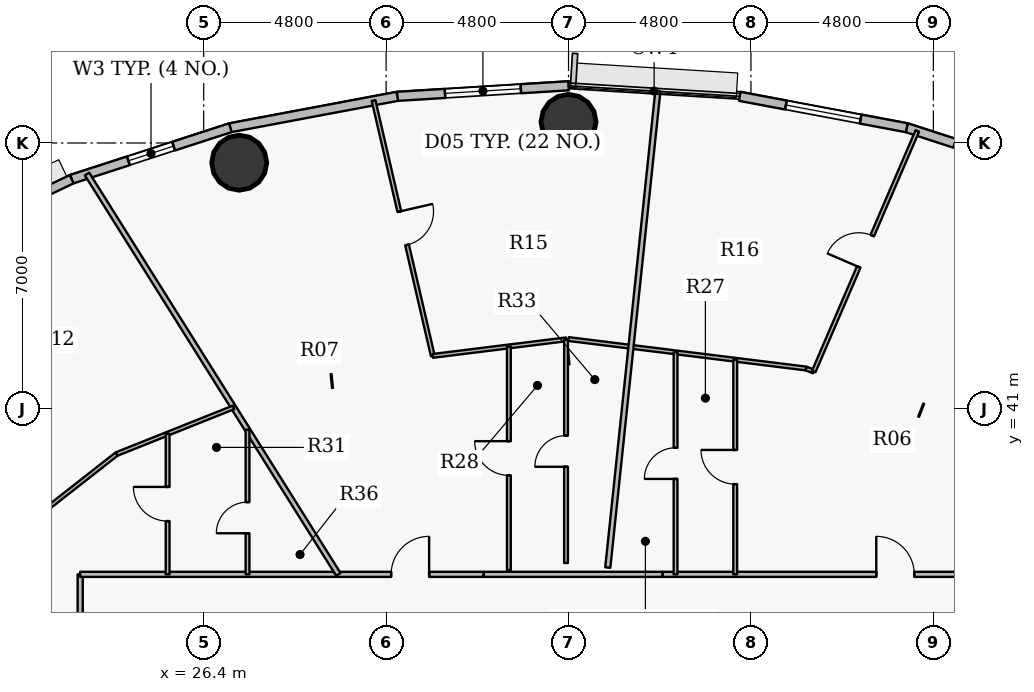
"""IFC4 building model, lengths in metres.
Left out: names, types, materials, properties, quantities, classifications, styles, units other than length and angle.
Written with IfcOpenShell. Run it as: python <this file> out.ifc"""

import sys

from ifc_helpers import new_model, si_unit, direction, frame, frame_2d, origin, origin_2d, place, context, subcontext, project, spatial, rectangle, hollow_circle, extrude, source, transform, mapped, element, fill, save


model = new_model("IFC4")
c1 = context("Model", 3, precision=1e-05, world=origin(), true_north=direction((0.0, 1.0)))
c2 = subcontext(c1, "Body", "Model", "MODEL_VIEW")
j1 = project(units=[si_unit("LENGTHUNIT", "METRE"), si_unit("PLANEANGLEUNIT", "RADIAN")], contexts=[c1])
p1 = place(None, origin())
s1 = spatial("IfcSite", under=j1, at=p1, CompositionType="ELEMENT")
p2 = place(p1, origin())
s2 = spatial("IfcBuilding", under=s1, at=p2, CompositionType="ELEMENT")
p3 = place(p2, frame((0.0, 0.0, 115.95)))
s3 = spatial("IfcBuildingStorey", under=s2, at=p3, CompositionType="ELEMENT", Elevation=115.95)
for number, where, z_axis, x_axis in (
    (1, (36.0, 48.555, 0.0), (0.0, 0.0, 1.0), (1.0, 0.0, 0.0)),
    (2, (27.334, 47.481, 0.0), (0.0, 0.0, 1.0), (1.0, 0.0, 0.0)),
):
    element("IfcColumn", number, at=place(p3, frame(where, z_axis=z_axis, x_axis=x_axis)), inside=s3, PredefinedType="COLUMN", context=c2, shape_type="SweptSolid", body=[
        extrude(hollow_circle(Radius=0.725, WallThickness=0.042, at=origin_2d()), origin(), (0.0, 0.0, 1.0), 3.75),
    ])
p4 = place(p3, frame((44.9, 48.401, 0.0), z_axis=(0.0, 0.0, 1.0), x_axis=(0.951211346073, -0.308540070495, 0.0)))
e3 = element("IfcWall", 3, at=p4, inside=s3, PredefinedType="SOLIDWALL", context=c2, shape_type="SweptSolid", body=[
    extrude(rectangle(XDim=4.388, YDim=0.24, at=frame_2d((2.194, 0.0))), origin(), (0.0, 0.0, 1.0), 3.5),
])
p5 = place(p4, frame((1.329, 0.0, 0.9)))
e4 = element("IfcOpeningElement", 4, at=p5, cuts=e3, PredefinedType="OPENING", context=c2, shape_type="SweptSolid", body=[
    extrude(rectangle(XDim=2.0, YDim=1.75, at=origin_2d()), frame((1.0, 0.13, 0.875), z_axis=(0.0, -1.0, 0.0), x_axis=(1.0, 0.0, 0.0)), (0.0, 0.0, 1.0), 0.26),
])
p6 = place(p3, frame((40.506, 49.227, 0.0), z_axis=(0.0, 0.0, 1.0), x_axis=(0.982789252177, -0.184730305596, 0.0)))
e5 = element("IfcWall", 5, at=p6, inside=s3, PredefinedType="SOLIDWALL", context=c2, shape_type="SweptSolid", body=[
    extrude(rectangle(XDim=4.471, YDim=0.24, at=frame_2d((2.235, 0.0))), origin(), (0.0, 0.0, 1.0), 3.5),
])
p7 = place(p6, frame((1.236, 0.0, 0.9)))
e6 = element("IfcOpeningElement", 6, at=p7, cuts=e5, PredefinedType="OPENING", context=c2, shape_type="SweptSolid", body=[
    extrude(rectangle(XDim=2.0, YDim=1.75, at=origin_2d()), frame((1.0, 0.13, 0.875), z_axis=(0.0, -1.0, 0.0), x_axis=(1.0, 0.0, 0.0)), (0.0, 0.0, 1.0), 0.26),
])
p8 = place(p3, frame((31.494, 49.227, 0.0), z_axis=(0.0, 0.0, 1.0), x_axis=(0.998107531589, 0.061492726276, 0.0)))
e7 = element("IfcWall", 7, at=p8, inside=s3, PredefinedType="SOLIDWALL", context=c2, shape_type="SweptSolid", body=[
    extrude(rectangle(XDim=4.514, YDim=0.24, at=frame_2d((2.257, 0.0))), origin(), (0.0, 0.0, 1.0), 3.5),
])
p9 = place(p8, frame((1.257, 0.0, 0.9)))
e8 = element("IfcOpeningElement", 8, at=p9, cuts=e7, PredefinedType="OPENING", context=c2, shape_type="SweptSolid", body=[
    extrude(rectangle(XDim=2.0, YDim=1.75, at=origin_2d()), frame((1.0, 0.13, 0.875), z_axis=(0.0, -1.0, 0.0), x_axis=(1.0, 0.0, 0.0)), (0.0, 0.0, 1.0), 0.26),
])
p10 = place(p3, frame((27.1, 48.401, 0.0), z_axis=(0.0, 0.0, 1.0), x_axis=(0.982789252177, 0.184730305596, 0.0)))
e9 = element("IfcWall", 9, at=p10, inside=s3, PredefinedType="SOLIDWALL", context=c2, shape_type="SweptSolid", body=[
    extrude(rectangle(XDim=4.471, YDim=0.24, at=frame_2d((2.235, 0.0))), origin(), (0.0, 0.0, 1.0), 3.5),
])
p11 = place(p3, frame((22.926, 47.047, 0.0), z_axis=(0.0, 0.0, 1.0), x_axis=(0.951211346073, 0.308540070495, 0.0)))
e10 = element("IfcWall", 10, at=p11, inside=s3, PredefinedType="SOLIDWALL", context=c2, shape_type="SweptSolid", body=[
    extrude(rectangle(XDim=4.388, YDim=0.24, at=frame_2d((2.194, 0.0))), origin(), (0.0, 0.0, 1.0), 3.5),
])
p12 = place(p11, frame((1.569, 0.0, 0.9)))
e11 = element("IfcOpeningElement", 11, at=p12, cuts=e10, PredefinedType="OPENING", context=c2, shape_type="SweptSolid", body=[
    extrude(rectangle(XDim=1.25, YDim=1.65, at=origin_2d()), frame((0.625, 0.13, 0.825), z_axis=(0.0, -1.0, 0.0), x_axis=(1.0, 0.0, 0.0)), (0.0, 0.0, 1.0), 0.26),
])
p13 = place(p3, frame((19.075, 45.199, 0.0), z_axis=(0.0, 0.0, 1.0), x_axis=(0.901589935876, 0.432591709962, 0.0)))
e12 = element("IfcWall", 12, at=p13, inside=s3, PredefinedType="SOLIDWALL", context=c2, shape_type="SweptSolid", body=[
    extrude(rectangle(XDim=4.272, YDim=0.24, at=frame_2d((2.136, 0.0))), origin(), (0.0, 0.0, 1.0), 3.5),
])
p14 = place(p13, frame((1.136, 0.0, 0.9)))
e13 = element("IfcOpeningElement", 13, at=p14, cuts=e12, PredefinedType="OPENING", context=c2, shape_type="SweptSolid", body=[
    extrude(rectangle(XDim=2.0, YDim=1.75, at=origin_2d()), frame((1.0, 0.13, 0.875), z_axis=(0.0, -1.0, 0.0), x_axis=(1.0, 0.0, 0.0)), (0.0, 0.0, 1.0), 0.26),
])
p15 = place(p3, frame((9.91, 36.375, 0.0), z_axis=(0.0, 0.0, 1.0), x_axis=(0.941089213164, -0.338158384292, 0.0)))
e14 = element("IfcWall", 14, at=p15, inside=s3, PredefinedType="PARTITIONING", context=c2, shape_type="SweptSolid", body=[
    extrude(rectangle(XDim=14.069, YDim=0.135, at=frame_2d((7.035, 0.0))), origin(), (0.0, 0.0, 1.0), 2.935),
])
p16 = place(p3, frame((22.064, 38.214, 0.0), z_axis=(0.0, 0.0, 1.0), x_axis=(0.787364158956, 0.616488184146, 0.0)))
e15 = element("IfcWall", 15, at=p16, inside=s3, PredefinedType="PARTITIONING", context=c2, shape_type="SweptSolid", body=[
    extrude(rectangle(XDim=2.597, YDim=0.1, at=frame_2d((1.299, 0.0))), origin(), (0.0, 0.0, 1.0), 3.5),
])
p17 = place(p3, frame((23.15, 17.35, 0.0), z_axis=(0.0, 0.0, 1.0), x_axis=(0.0, 1.0, 0.0)))
e16 = element("IfcWall", 16, at=p17, inside=s3, PredefinedType="PARTITIONING", context=c2, shape_type="SweptSolid", body=[
    extrude(rectangle(XDim=19.3, YDim=0.135, at=frame_2d((9.65, 0.0))), origin(), (0.0, 0.0, 1.0), 2.935),
])
p18 = place(p17, frame((16.264, 0.0, 0.0)))
e17 = element("IfcOpeningElement", 17, at=p18, cuts=e16, PredefinedType="OPENING", context=c2, shape_type="SweptSolid", body=[
    extrude(rectangle(XDim=1.0, YDim=2.15, at=origin_2d()), frame((0.5, 0.078, 1.075), z_axis=(0.0, -1.0, 0.0), x_axis=(1.0, 0.0, 0.0)), (0.0, 0.0, 1.0), 0.155),
])
p19 = place(p17, frame((7.426, 0.0, 0.0)))
e18 = element("IfcOpeningElement", 18, at=p19, cuts=e16, PredefinedType="OPENING", context=c2, shape_type="SweptSolid", body=[
    extrude(rectangle(XDim=1.0, YDim=2.15, at=origin_2d()), frame((0.5, 0.078, 1.075), z_axis=(0.0, -1.0, 0.0), x_axis=(1.0, 0.0, 0.0)), (0.0, 0.0, 1.0), 0.155),
])
p20 = place(p3, frame((23.15, 36.65, 0.0), z_axis=(0.0, 0.0, 1.0), x_axis=(1.0, 0.0, 0.0)))
e19 = element("IfcWall", 19, at=p20, inside=s3, PredefinedType="PARTITIONING", context=c2, shape_type="SweptSolid", body=[
    extrude(rectangle(XDim=10.612, YDim=0.135, at=frame_2d((5.306, 0.0))), origin(), (0.0, 0.0, 1.0), 2.935),
])
p21 = place(p20, frame((8.182, 0.0, 0.0)))
e20 = element("IfcOpeningElement", 20, at=p21, cuts=e19, PredefinedType="OPENING", context=c2, shape_type="SweptSolid", body=[
    extrude(rectangle(XDim=1.0, YDim=2.15, at=origin_2d()), frame((0.5, 0.078, 1.075), z_axis=(0.0, -1.0, 0.0), x_axis=(1.0, 0.0, 0.0)), (0.0, 0.0, 1.0), 0.155),
])
p22 = place(p3, frame((23.33, 47.184, 0.0), z_axis=(0.0, 0.0, 1.0), x_axis=(0.531660079213, -0.846957826678, 0.0)))
e21 = element("IfcWall", 21, at=p22, inside=s3, PredefinedType="PARTITIONING", context=c2, shape_type="SweptSolid", body=[
    extrude(rectangle(XDim=12.437, YDim=0.135, at=frame_2d((6.219, 0.0))), origin(), (0.0, 0.0, 1.0), 2.935),
])
p23 = place(p3, frame((24.109, 39.816, 0.0), z_axis=(0.0, 0.0, 1.0), x_axis=(0.928811896505, 0.370551563092, 0.0)))
e22 = element("IfcWall", 22, at=p23, inside=s3, PredefinedType="PARTITIONING", context=c2, shape_type="SweptSolid", body=[
    extrude(rectangle(XDim=3.312, YDim=0.1, at=frame_2d((1.656, 0.0))), origin(), (0.0, 0.0, 1.0), 3.5),
])
p24 = place(p3, frame((25.451, 36.65, 0.0), z_axis=(0.0, 0.0, 1.0), x_axis=(0.0, 1.0, 0.0)))
e23 = element("IfcWall", 23, at=p24, inside=s3, PredefinedType="PARTITIONING", context=c2, shape_type="SweptSolid", body=[
    extrude(rectangle(XDim=3.701, YDim=0.1, at=frame_2d((1.851, 0.0))), origin(), (0.0, 0.0, 1.0), 3.5),
])
p25 = place(p24, frame((1.4, 0.0, 0.0)))
e24 = element("IfcOpeningElement", 24, at=p25, cuts=e23, PredefinedType="OPENING", context=c2, shape_type="SweptSolid", body=[
    extrude(rectangle(XDim=0.9, YDim=2.1, at=origin_2d()), frame((0.45, 0.06, 1.05), z_axis=(0.0, -1.0, 0.0), x_axis=(1.0, 0.0, 0.0)), (0.0, 0.0, 1.0), 0.12),
])
p26 = place(p3, frame((27.553, 36.65, 0.0), z_axis=(0.0, 0.0, 1.0), x_axis=(0.0, 1.0, 0.0)))
e25 = element("IfcWall", 25, at=p26, inside=s3, PredefinedType="PARTITIONING", context=c2, shape_type="SweptSolid", body=[
    extrude(rectangle(XDim=3.806, YDim=0.1, at=frame_2d((1.903, 0.0))), origin(), (0.0, 0.0, 1.0), 3.5),
])
p27 = place(p26, frame((1.081, 0.0, 0.0)))
e26 = element("IfcOpeningElement", 26, at=p27, cuts=e25, PredefinedType="OPENING", context=c2, shape_type="SweptSolid", body=[
    extrude(rectangle(XDim=0.82, YDim=2.1, at=origin_2d()), frame((0.41, 0.06, 1.05), z_axis=(0.0, -1.0, 0.0), x_axis=(1.0, 0.0, 0.0)), (0.0, 0.0, 1.0), 0.12),
])
p28 = place(p3, frame((30.87, 49.115, 0.0), z_axis=(0.0, 0.0, 1.0), x_axis=(0.225963524246, -0.97413576349, 0.0)))
e27 = element("IfcWall", 27, at=p28, inside=s3, PredefinedType="PARTITIONING", context=c2, shape_type="SweptSolid", body=[
    extrude(rectangle(XDim=6.895, YDim=0.1, at=frame_2d((3.448, 0.0))), origin(), (0.0, 0.0, 1.0), 2.935),
])
p29 = place(p28, frame((2.998, 0.0, 0.0)))
e28 = element("IfcOpeningElement", 28, at=p29, cuts=e27, PredefinedType="OPENING", context=c2, shape_type="SweptSolid", body=[
    extrude(rectangle(XDim=0.9, YDim=2.1, at=origin_2d()), frame((0.45, 0.06, 1.05), z_axis=(0.0, -1.0, 0.0), x_axis=(1.0, 0.0, 0.0)), (0.0, 0.0, 1.0), 0.12),
])
p30 = place(p3, frame((32.428, 42.398, 0.0), z_axis=(0.0, 0.0, 1.0), x_axis=(0.992389102891, 0.123141660146, 0.0)))
e29 = element("IfcWall", 29, at=p30, inside=s3, PredefinedType="PARTITIONING", context=c2, shape_type="SweptSolid", body=[
    extrude(rectangle(XDim=3.533, YDim=0.1, at=frame_2d((1.767, 0.0))), origin(), (0.0, 0.0, 1.0), 2.935),
])
p31 = place(p3, frame((34.43, 36.762, 0.0), z_axis=(0.0, 0.0, 1.0), x_axis=(0.0, 1.0, 0.0)))
e30 = element("IfcWall", 30, at=p31, inside=s3, PredefinedType="PARTITIONING", context=c2, shape_type="SweptSolid", body=[
    extrude(rectangle(XDim=5.884, YDim=0.1, at=frame_2d((2.942, 0.0))), origin(), (0.0, 0.0, 1.0), 3.185),
])
p32 = place(p31, frame((2.492, 0.0, 0.0)))
e31 = element("IfcOpeningElement", 31, at=p32, cuts=e30, PredefinedType="OPENING", context=c2, shape_type="SweptSolid", body=[
    extrude(rectangle(XDim=0.9, YDim=2.1, at=origin_2d()), frame((0.45, 0.06, 1.05), z_axis=(0.0, -1.0, 0.0), x_axis=(1.0, 0.0, 0.0)), (0.0, 0.0, 1.0), 0.12),
])
p33 = place(p3, frame((35.935, 36.949, 0.0), z_axis=(0.0, 0.0, 1.0), x_axis=(0.0, 1.0, 0.0)))
e32 = element("IfcWall", 32, at=p33, inside=s3, PredefinedType="PARTITIONING", context=c2, shape_type="SweptSolid", body=[
    extrude(rectangle(XDim=5.884, YDim=0.1, at=frame_2d((2.942, 0.0))), origin(), (0.0, 0.0, 1.0), 2.935),
])
p34 = place(p33, frame((2.532, 0.0, 0.0)))
e33 = element("IfcOpeningElement", 33, at=p34, cuts=e32, PredefinedType="OPENING", context=c2, shape_type="SweptSolid", body=[
    extrude(rectangle(XDim=0.82, YDim=2.1, at=origin_2d()), frame((0.41, 0.06, 1.05), z_axis=(0.0, -1.0, 0.0), x_axis=(1.0, 0.0, 0.0)), (0.0, 0.0, 1.0), 0.12),
])
p35 = place(p3, frame((36.0, 42.841, 0.0), z_axis=(0.0, 0.0, 1.0), x_axis=(0.992395485088, -0.123090215599, 0.0)))
e34 = element("IfcWall", 34, at=p35, inside=s3, PredefinedType="PARTITIONING", context=c2, shape_type="SweptSolid", body=[
    extrude(rectangle(XDim=6.299, YDim=0.1, at=frame_2d((3.15, 0.0))), origin(), (0.0, 0.0, 1.0), 2.935),
])
p36 = place(p3, frame((37.033, 36.829, 0.0), z_axis=(0.0, 0.0, 1.0), x_axis=(0.104530526966, 0.994521678463, 0.0)))
e35 = element("IfcWall", 35, at=p36, inside=s3, PredefinedType="PARTITIONING", context=c2, shape_type="SweptSolid", body=[
    extrude(rectangle(XDim=12.605, YDim=0.135, at=frame_2d((6.303, 0.0))), origin(), (0.0, 0.0, 1.0), 2.935),
])
p37 = place(p3, frame((38.477, 36.65, 0.0), z_axis=(0.0, 0.0, 1.0), x_axis=(1.0, 0.0, 0.0)))
e36 = element("IfcWall", 36, at=p37, inside=s3, PredefinedType="PARTITIONING", context=c2, shape_type="SweptSolid", body=[
    extrude(rectangle(XDim=10.373, YDim=0.135, at=frame_2d((5.187, 0.0))), origin(), (0.0, 0.0, 1.0), 2.935),
])
p38 = place(p37, frame((5.621, 0.0, 0.0)))
e37 = element("IfcOpeningElement", 37, at=p38, cuts=e36, PredefinedType="OPENING", context=c2, shape_type="SweptSolid", body=[
    extrude(rectangle(XDim=1.0, YDim=2.15, at=origin_2d()), frame((0.5, 0.078, 1.075), z_axis=(0.0, -1.0, 0.0), x_axis=(1.0, 0.0, 0.0)), (0.0, 0.0, 1.0), 0.155),
])
p39 = place(p3, frame((38.817, 36.65, 0.0), z_axis=(0.0, 0.0, 1.0), x_axis=(0.0, 1.0, 0.0)))
e38 = element("IfcWall", 38, at=p39, inside=s3, PredefinedType="PARTITIONING", context=c2, shape_type="SweptSolid", body=[
    extrude(rectangle(XDim=5.842, YDim=0.1, at=frame_2d((2.921, 0.0))), origin(), (0.0, 0.0, 1.0), 3.5),
])
p40 = place(p39, frame((2.511, 0.0, 0.0)))
e39 = element("IfcOpeningElement", 39, at=p40, cuts=e38, PredefinedType="OPENING", context=c2, shape_type="SweptSolid", body=[
    extrude(rectangle(XDim=0.82, YDim=2.1, at=origin_2d()), frame((0.41, 0.06, 1.05), z_axis=(0.0, -1.0, 0.0), x_axis=(1.0, 0.0, 0.0)), (0.0, 0.0, 1.0), 0.12),
])
p41 = place(p3, frame((40.386, 36.65, 0.0), z_axis=(0.0, 0.0, 1.0), x_axis=(0.0, 1.0, 0.0)))
e40 = element("IfcWall", 40, at=p41, inside=s3, PredefinedType="PARTITIONING", context=c2, shape_type="SweptSolid", body=[
    extrude(rectangle(XDim=5.647, YDim=0.1, at=frame_2d((2.824, 0.0))), origin(), (0.0, 0.0, 1.0), 3.5),
])
p42 = place(p41, frame((2.374, 0.0, 0.0)))
e41 = element("IfcOpeningElement", 41, at=p42, cuts=e40, PredefinedType="OPENING", context=c2, shape_type="SweptSolid", body=[
    extrude(rectangle(XDim=0.9, YDim=2.1, at=origin_2d()), frame((0.45, 0.06, 1.05), z_axis=(0.0, -1.0, 0.0), x_axis=(1.0, 0.0, 0.0)), (0.0, 0.0, 1.0), 0.12),
])
p43 = place(p3, frame((42.251, 42.066, 0.0), z_axis=(0.0, 0.0, 1.0), x_axis=(0.928632622675, -0.371000609303, 0.0)))
e42 = element("IfcWall", 42, at=p43, inside=s3, PredefinedType="PARTITIONING", context=c2, shape_type="SweptSolid", body=[
    extrude(rectangle(XDim=0.216, YDim=0.1, at=frame_2d((0.108, 0.0))), origin(), (0.0, 0.0, 1.0), 3.5),
])
p44 = place(p3, frame((42.452, 41.986, 0.0), z_axis=(0.0, 0.0, 1.0), x_axis=(0.395466235438, 0.918480515105, 0.0)))
e43 = element("IfcWall", 43, at=p44, inside=s3, PredefinedType="PARTITIONING", context=c2, shape_type="SweptSolid", body=[
    extrude(rectangle(XDim=6.893, YDim=0.1, at=frame_2d((3.446, 0.0))), origin(), (0.0, 0.0, 1.0), 2.935),
])
p45 = place(p44, frame((2.996, 0.0, 0.0)))
e44 = element("IfcOpeningElement", 44, at=p45, cuts=e43, PredefinedType="OPENING", context=c2, shape_type="SweptSolid", body=[
    extrude(rectangle(XDim=0.9, YDim=2.1, at=origin_2d()), frame((0.45, 0.06, 1.05), z_axis=(0.0, -1.0, 0.0), x_axis=(1.0, 0.0, 0.0)), (0.0, 0.0, 1.0), 0.12),
])
p46 = place(p3, frame((33.772, 36.65, 0.0), z_axis=(0.0, 0.0, 1.0), x_axis=(1.0, 0.0, 0.0)))
e45 = element("IfcWall", 45, at=p46, inside=s3, PredefinedType="PARTITIONING", context=c2, shape_type="SweptSolid", body=[
    extrude(rectangle(XDim=4.695, YDim=0.135, at=frame_2d((2.348, 0.0))), origin(), (0.0, 0.0, 1.0), 2.935),
])
m1 = source(origin(), c2, "Body", "SweptSolid", [
    extrude(rectangle(XDim=2.0, YDim=1.75, at=origin_2d()), frame((1.0, 0.03, 0.875), z_axis=(0.0, -1.0, 0.0), x_axis=(1.0, 0.0, 0.0)), (0.0, 0.0, 1.0), 0.06),
])
p47 = place(p7, origin())
e46 = element("IfcWindow", 46, at=p47, inside=s3, PartitioningType="DOUBLE_PANEL_VERTICAL", PredefinedType="WINDOW", context=c2, shape_type="MappedRepresentation", body=[
    mapped(m1, transform((0.0, 0.0, 0.0), x_axis=(1.0, 0.0, 0.0), y_axis=(0.0, 1.0, 0.0), z_axis=(0.0, 0.0, 1.0), scale=1.0)),
])
fill(e6, e46)
p48 = place(p9, origin())
e47 = element("IfcWindow", 47, at=p48, inside=s3, PartitioningType="DOUBLE_PANEL_VERTICAL", PredefinedType="WINDOW", context=c2, shape_type="MappedRepresentation", body=[
    mapped(m1, transform((0.0, 0.0, 0.0), x_axis=(1.0, 0.0, 0.0), y_axis=(0.0, 1.0, 0.0), z_axis=(0.0, 0.0, 1.0), scale=1.0)),
])
fill(e8, e47)
m2 = source(origin(), c2, "Body", "SweptSolid", [
    extrude(rectangle(XDim=1.25, YDim=1.65, at=origin_2d()), frame((0.625, 0.03, 0.825), z_axis=(0.0, -1.0, 0.0), x_axis=(1.0, 0.0, 0.0)), (0.0, 0.0, 1.0), 0.06),
])
p49 = place(p12, origin())
e48 = element("IfcWindow", 48, at=p49, inside=s3, PartitioningType="SINGLE_PANEL", PredefinedType="WINDOW", context=c2, shape_type="MappedRepresentation", body=[
    mapped(m2, transform((0.0, 0.0, 0.0), x_axis=(1.0, 0.0, 0.0), y_axis=(0.0, 1.0, 0.0), z_axis=(0.0, 0.0, 1.0), scale=1.0)),
])
fill(e11, e48)
m3 = source(origin(), c2, "Body", "SweptSolid", [
    extrude(rectangle(XDim=1.0, YDim=2.15, at=origin_2d()), frame((0.5, 0.025, 1.075), z_axis=(0.0, -1.0, 0.0), x_axis=(1.0, 0.0, 0.0)), (0.0, 0.0, 1.0), 0.05),
])
p50 = place(p21, origin())
e49 = element("IfcDoor", 49, at=p50, inside=s3, OperationType="SINGLE_SWING_RIGHT", PredefinedType="DOOR", context=c2, shape_type="MappedRepresentation", body=[
    mapped(m3, transform((0.0, 0.0, 0.0), x_axis=(1.0, 0.0, 0.0), y_axis=(0.0, 1.0, 0.0), z_axis=(0.0, 0.0, 1.0), scale=1.0)),
])
fill(e20, e49)
m4 = source(origin(), c2, "Body", "SweptSolid", [
    extrude(rectangle(XDim=0.9, YDim=2.1, at=origin_2d()), frame((0.45, 0.025, 1.05), z_axis=(0.0, -1.0, 0.0), x_axis=(1.0, 0.0, 0.0)), (0.0, 0.0, 1.0), 0.05),
])
p51 = place(p29, origin())
e50 = element("IfcDoor", 50, at=p51, inside=s3, OperationType="SINGLE_SWING_LEFT", PredefinedType="DOOR", context=c2, shape_type="MappedRepresentation", body=[
    mapped(m4, transform((0.0, 0.0, 0.0), x_axis=(1.0, 0.0, 0.0), y_axis=(0.0, 1.0, 0.0), z_axis=(0.0, 0.0, 1.0), scale=1.0)),
])
fill(e28, e50)
p52 = place(p32, origin())
e51 = element("IfcDoor", 51, at=p52, inside=s3, OperationType="SINGLE_SWING_RIGHT", PredefinedType="DOOR", context=c2, shape_type="MappedRepresentation", body=[
    mapped(m4, transform((0.0, 0.0, 0.0), x_axis=(1.0, 0.0, 0.0), y_axis=(0.0, 1.0, 0.0), z_axis=(0.0, 0.0, 1.0), scale=1.0)),
])
fill(e31, e51)
m5 = source(origin(), c2, "Body", "SweptSolid", [
    extrude(rectangle(XDim=0.82, YDim=2.1, at=origin_2d()), frame((0.41, 0.025, 1.05), z_axis=(0.0, -1.0, 0.0), x_axis=(1.0, 0.0, 0.0)), (0.0, 0.0, 1.0), 0.05),
])
p53 = place(p34, origin())
e52 = element("IfcDoor", 52, at=p53, inside=s3, OperationType="SINGLE_SWING_LEFT", PredefinedType="DOOR", context=c2, shape_type="MappedRepresentation", body=[
    mapped(m5, transform((0.0, 0.0, 0.0), x_axis=(1.0, 0.0, 0.0), y_axis=(0.0, 1.0, 0.0), z_axis=(0.0, 0.0, 1.0), scale=1.0)),
])
fill(e33, e52)
p54 = place(p25, origin())
e53 = element("IfcDoor", 53, at=p54, inside=s3, OperationType="SINGLE_SWING_RIGHT", PredefinedType="DOOR", context=c2, shape_type="MappedRepresentation", body=[
    mapped(m4, transform((0.0, 0.0, 0.0), x_axis=(1.0, 0.0, 0.0), y_axis=(0.0, 1.0, 0.0), z_axis=(0.0, 0.0, 1.0), scale=1.0)),
])
fill(e24, e53)
p55 = place(p27, origin())
e54 = element("IfcDoor", 54, at=p55, inside=s3, OperationType="SINGLE_SWING_LEFT", PredefinedType="DOOR", context=c2, shape_type="MappedRepresentation", body=[
    mapped(m5, transform((0.0, 0.0, 0.0), x_axis=(1.0, 0.0, 0.0), y_axis=(0.0, 1.0, 0.0), z_axis=(0.0, 0.0, 1.0), scale=1.0)),
])
fill(e26, e54)
p56 = place(p38, origin())
e55 = element("IfcDoor", 55, at=p56, inside=s3, OperationType="SINGLE_SWING_LEFT", PredefinedType="DOOR", context=c2, shape_type="MappedRepresentation", body=[
    mapped(m3, transform((0.0, 0.0, 0.0), x_axis=(1.0, 0.0, 0.0), y_axis=(0.0, 1.0, 0.0), z_axis=(0.0, 0.0, 1.0), scale=1.0)),
])
fill(e37, e55)
p57 = place(p45, origin())
e56 = element("IfcDoor", 56, at=p57, inside=s3, OperationType="SINGLE_SWING_LEFT", PredefinedType="DOOR", context=c2, shape_type="MappedRepresentation", body=[
    mapped(m4, transform((0.0, 0.0, 0.0), x_axis=(1.0, 0.0, 0.0), y_axis=(0.0, 1.0, 0.0), z_axis=(0.0, 0.0, 1.0), scale=1.0)),
])
fill(e44, e56)
p58 = place(p42, origin())
e57 = element("IfcDoor", 57, at=p58, inside=s3, OperationType="SINGLE_SWING_RIGHT", PredefinedType="DOOR", context=c2, shape_type="MappedRepresentation", body=[
    mapped(m4, transform((0.0, 0.0, 0.0), x_axis=(1.0, 0.0, 0.0), y_axis=(0.0, 1.0, 0.0), z_axis=(0.0, 0.0, 1.0), scale=1.0)),
])
fill(e41, e57)
p59 = place(p40, origin())
e58 = element("IfcDoor", 58, at=p59, inside=s3, OperationType="SINGLE_SWING_LEFT", PredefinedType="DOOR", context=c2, shape_type="MappedRepresentation", body=[
    mapped(m5, transform((0.0, 0.0, 0.0), x_axis=(1.0, 0.0, 0.0), y_axis=(0.0, 1.0, 0.0), z_axis=(0.0, 0.0, 1.0), scale=1.0)),
])
fill(e39, e58)
save(model, sys.argv[1])
